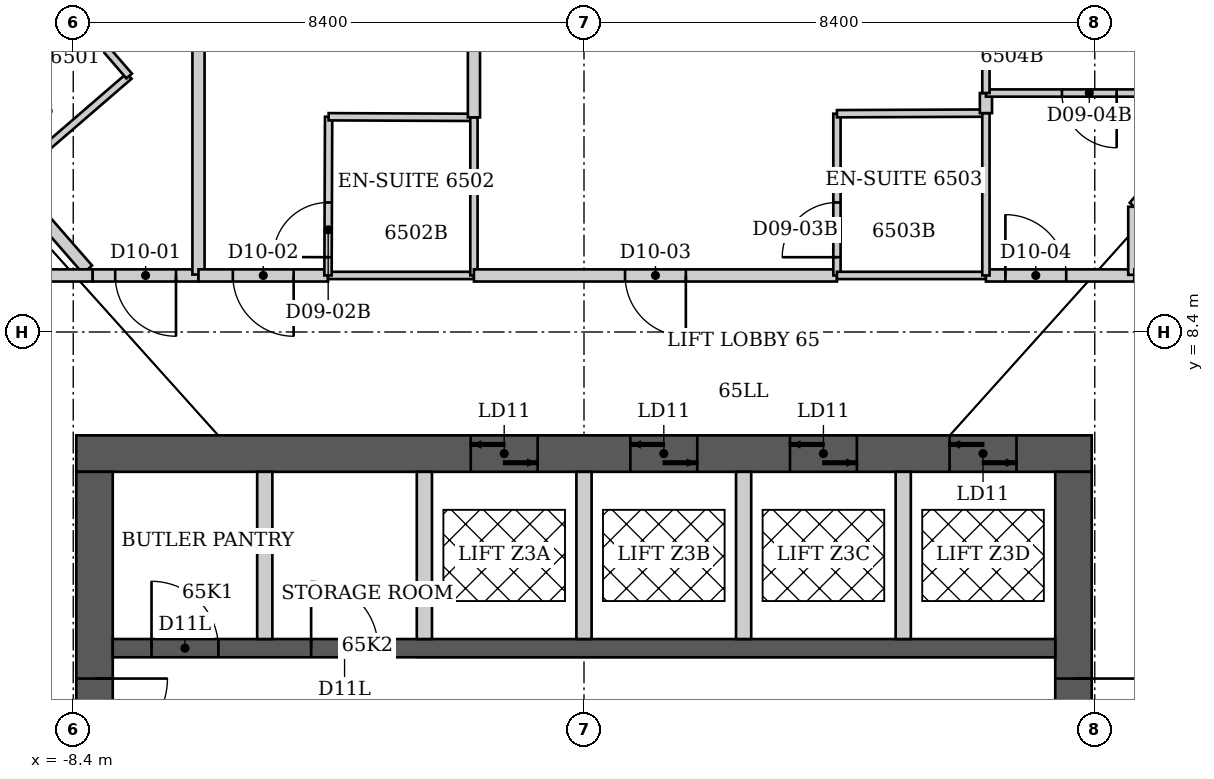
"""IFC4 building model, lengths in metres.
Left out: names, types, materials, properties, quantities, classifications, styles, units other than length and angle.
Written with IfcOpenShell. Run it as: python <this file> out.ifc"""

import sys

from ifc_helpers import new_model, si_unit, direction, frame, frame_2d, origin, place, context, subcontext, project, spatial, rectangle, extrude, element, fill, save


model = new_model("IFC4")
c1 = context("Model", 3, precision=1e-05, world=origin(), true_north=direction((0.0, 1.0)))
c2 = subcontext(c1, "Body", "Model", "MODEL_VIEW")
j1 = project(units=[si_unit("LENGTHUNIT", "METRE"), si_unit("PLANEANGLEUNIT", "RADIAN")], contexts=[c1])
p1 = place(None, origin())
s1 = spatial("IfcSite", under=j1, at=p1, CompositionType="ELEMENT")
p2 = place(p1, origin())
s2 = spatial("IfcBuilding", under=s1, at=p2, CompositionType="ELEMENT")
p3 = place(p2, frame((0.0, 0.0, 260.8)))
s3 = spatial("IfcBuildingStorey", under=s2, at=p3, CompositionType="ELEMENT", Elevation=260.8)
p4 = place(p3, frame((-8.35, 6.4, 0.0), z_axis=(0.0, 0.0, 1.0), x_axis=(1.0, 0.0, 0.0)))
e1 = element("IfcWall", 1, at=p4, inside=s3, PredefinedType="SHEAR", context=c2, shape_type="SweptSolid", body=[
    extrude(rectangle(XDim=16.7, YDim=0.6, at=frame_2d((8.35, 0.0))), origin(), (0.0, 0.0, 1.0), 3.8),
])
p5 = place(p4, frame((6.488, 0.0, 0.0)))
e2 = element("IfcOpeningElement", 2, at=p5, cuts=e1, PredefinedType="OPENING", context=c2, shape_type="SweptSolid", body=[
    extrude(rectangle(XDim=1.1, YDim=2.1, at=frame_2d((0.55, 1.05))), frame((0.0, 0.3, 0.0), z_axis=(0.0, -1.0, 0.0), x_axis=(1.0, 0.0, 0.0)), (0.0, 0.0, 1.0), 0.6),
])
p6 = place(p4, frame((9.113, 0.0, 0.0)))
e3 = element("IfcOpeningElement", 3, at=p6, cuts=e1, PredefinedType="OPENING", context=c2, shape_type="SweptSolid", body=[
    extrude(rectangle(XDim=1.1, YDim=2.1, at=frame_2d((0.55, 1.05))), frame((0.0, 0.3, 0.0), z_axis=(0.0, -1.0, 0.0), x_axis=(1.0, 0.0, 0.0)), (0.0, 0.0, 1.0), 0.6),
])
p7 = place(p4, frame((11.738, 0.0, 0.0)))
e4 = element("IfcOpeningElement", 4, at=p7, cuts=e1, PredefinedType="OPENING", context=c2, shape_type="SweptSolid", body=[
    extrude(rectangle(XDim=1.1, YDim=2.1, at=frame_2d((0.55, 1.05))), frame((0.0, 0.3, 0.0), z_axis=(0.0, -1.0, 0.0), x_axis=(1.0, 0.0, 0.0)), (0.0, 0.0, 1.0), 0.6),
])
p8 = place(p4, frame((14.363, 0.0, 0.0)))
e5 = element("IfcOpeningElement", 5, at=p8, cuts=e1, PredefinedType="OPENING", context=c2, shape_type="SweptSolid", body=[
    extrude(rectangle(XDim=1.1, YDim=2.1, at=frame_2d((0.55, 1.05))), frame((0.0, 0.3, 0.0), z_axis=(0.0, -1.0, 0.0), x_axis=(1.0, 0.0, 0.0)), (0.0, 0.0, 1.0), 0.6),
])
p9 = place(p3, frame((-8.05, -6.1, 0.0), z_axis=(0.0, 0.0, 1.0), x_axis=(0.0, 1.0, 0.0)))
e6 = element("IfcWall", 6, at=p9, inside=s3, PredefinedType="SHEAR", context=c2, shape_type="SweptSolid", body=[
    extrude(rectangle(XDim=12.2, YDim=0.6, at=frame_2d((6.1, 0.0))), origin(), (0.0, 0.0, 1.0), 3.8),
])
p10 = place(p9, frame((7.6, 0.0, 0.0)))
e7 = element("IfcOpeningElement", 7, at=p10, cuts=e6, PredefinedType="OPENING", context=c2, shape_type="SweptSolid", body=[
    extrude(rectangle(XDim=1.2, YDim=2.2, at=frame_2d((0.6, 1.1))), frame((0.0, 0.3, 0.0), z_axis=(0.0, -1.0, 0.0), x_axis=(1.0, 0.0, 0.0)), (0.0, 0.0, 1.0), 0.6),
])
p11 = place(p3, frame((8.05, -6.1, 0.0), z_axis=(0.0, 0.0, 1.0), x_axis=(0.0, 1.0, 0.0)))
e8 = element("IfcWall", 8, at=p11, inside=s3, PredefinedType="SHEAR", context=c2, shape_type="SweptSolid", body=[
    extrude(rectangle(XDim=12.2, YDim=0.6, at=frame_2d((6.1, 0.0))), origin(), (0.0, 0.0, 1.0), 3.8),
])
p12 = place(p11, frame((7.6, 0.0, 0.0)))
e9 = element("IfcOpeningElement", 9, at=p12, cuts=e8, PredefinedType="OPENING", context=c2, shape_type="SweptSolid", body=[
    extrude(rectangle(XDim=1.2, YDim=2.2, at=frame_2d((0.6, 1.1))), frame((0.0, 0.3, 0.0), z_axis=(0.0, -1.0, 0.0), x_axis=(1.0, 0.0, 0.0)), (0.0, 0.0, 1.0), 0.6),
])
p13 = place(p3, frame((-7.75, 3.2, 0.0), z_axis=(0.0, 0.0, 1.0), x_axis=(1.0, 0.0, 0.0)))
e10 = element("IfcWall", 10, at=p13, inside=s3, PredefinedType="SHEAR", context=c2, shape_type="SweptSolid", body=[
    extrude(rectangle(XDim=15.5, YDim=0.3, at=frame_2d((7.75, 0.0))), origin(), (0.0, 0.0, 1.0), 3.8),
])
p14 = place(p13, frame((0.637, 0.0, 0.0)))
e11 = element("IfcOpeningElement", 11, at=p14, cuts=e10, PredefinedType="OPENING", context=c2, shape_type="SweptSolid", body=[
    extrude(rectangle(XDim=1.1, YDim=2.2, at=frame_2d((0.55, 1.1))), frame((0.0, 0.15, 0.0), z_axis=(0.0, -1.0, 0.0), x_axis=(1.0, 0.0, 0.0)), (0.0, 0.0, 1.0), 0.3),
])
p15 = place(p13, frame((3.262, 0.0, 0.0)))
e12 = element("IfcOpeningElement", 12, at=p15, cuts=e10, PredefinedType="OPENING", context=c2, shape_type="SweptSolid", body=[
    extrude(rectangle(XDim=1.1, YDim=2.2, at=frame_2d((0.55, 1.1))), frame((0.0, 0.15, 0.0), z_axis=(0.0, -1.0, 0.0), x_axis=(1.0, 0.0, 0.0)), (0.0, 0.0, 1.0), 0.3),
])
for number, where, z_axis, x_axis in (
    (13, (-5.25, 3.35, 0.0), (0.0, 0.0, 1.0), (0.0, 1.0, 0.0)),
    (14, (-2.625, 3.35, 0.0), (0.0, 0.0, 1.0), (0.0, 1.0, 0.0)),
    (15, (0.0, 3.35, 0.0), (0.0, 0.0, 1.0), (0.0, 1.0, 0.0)),
    (16, (2.625, 3.35, 0.0), (0.0, 0.0, 1.0), (0.0, 1.0, 0.0)),
    (17, (5.25, 3.35, 0.0), (0.0, 0.0, 1.0), (0.0, 1.0, 0.0)),
):
    element("IfcWall", number, at=place(p3, frame(where, z_axis=z_axis, x_axis=x_axis)), inside=s3, PredefinedType="PARTITIONING", context=c2, shape_type="SweptSolid", body=[
        extrude(rectangle(XDim=2.75, YDim=0.25, at=frame_2d((1.375, 0.0))), origin(), (0.0, 0.0, 1.0), 3.8),
    ])
p16 = place(p3, frame((-9.45, 10.91, 0.0), z_axis=(0.0, 0.0, 1.0), x_axis=(0.757040252764, 0.65336823897, 0.0)))
e18 = element("IfcWall", 18, at=p16, inside=s3, PredefinedType="PARTITIONING", context=c2, shape_type="SweptSolid", body=[
    extrude(rectangle(XDim=2.602, YDim=0.12, at=frame_2d((1.301, 0.0))), origin(), (0.0, 0.0, 1.0), 3.64),
])
p17 = place(p3, frame((-9.37, 10.81, 0.0), z_axis=(0.0, 0.0, 1.0), x_axis=(0.657042073586, -0.753853907291, 0.0)))
e19 = element("IfcWall", 19, at=p17, inside=s3, PredefinedType="PARTITIONING", context=c2, shape_type="SweptSolid", body=[
    extrude(rectangle(XDim=1.833, YDim=0.2, at=frame_2d((0.917, 0.0))), origin(), (0.0, 0.0, 1.0), 3.64),
])
p18 = place(p3, frame((-8.08, 9.33, 0.0), z_axis=(0.0, 0.0, 1.0), x_axis=(-1.0, 0.0, 0.0)))
e20 = element("IfcWall", 20, at=p18, inside=s3, PredefinedType="PARTITIONING", context=c2, shape_type="SweptSolid", body=[
    extrude(rectangle(XDim=3.11, YDim=0.2, at=frame_2d((1.555, 0.0))), origin(), (0.0, 0.0, 1.0), 3.64),
])
p19 = place(p18, frame((1.1, 0.0, 0.0)))
e21 = element("IfcOpeningElement", 21, at=p19, cuts=e20, PredefinedType="OPENING", context=c2, shape_type="SweptSolid", body=[
    extrude(rectangle(XDim=1.0, YDim=2.13, at=frame_2d((0.5, 1.065))), frame((0.0, 0.1, 0.0), z_axis=(0.0, -1.0, 0.0), x_axis=(1.0, 0.0, 0.0)), (0.0, 0.0, 1.0), 0.2),
])
p20 = place(p3, frame((-7.48, 12.61, 0.0), z_axis=(0.0, 0.0, 1.0), x_axis=(-0.653238965593, 0.75715180369, 0.0)))
e22 = element("IfcWall", 22, at=p20, inside=s3, PredefinedType="PARTITIONING", context=c2, shape_type="SweptSolid", body=[
    extrude(rectangle(XDim=2.404, YDim=0.12, at=frame_2d((1.202, 0.0))), origin(), (0.0, 0.0, 1.0), 3.64),
])
p21 = place(p3, frame((-6.34, 9.33, 0.0), z_axis=(0.0, 0.0, 1.0), x_axis=(-1.0, 0.0, 0.0)))
e23 = element("IfcWall", 23, at=p21, inside=s3, PredefinedType="PARTITIONING", context=c2, shape_type="SweptSolid", body=[
    extrude(rectangle(XDim=1.74, YDim=0.2, at=frame_2d((0.87, 0.0))), origin(), (0.0, 0.0, 1.0), 3.64),
])
p22 = place(p21, frame((0.37, 0.0, 0.0)))
e24 = element("IfcOpeningElement", 24, at=p22, cuts=e23, PredefinedType="OPENING", context=c2, shape_type="SweptSolid", body=[
    extrude(rectangle(XDim=1.0, YDim=2.13, at=frame_2d((0.5, 1.065))), frame((0.0, 0.1, 0.0), z_axis=(0.0, -1.0, 0.0), x_axis=(1.0, 0.0, 0.0)), (0.0, 0.0, 1.0), 0.2),
])
p23 = place(p3, frame((-6.34, 19.8, 0.0), z_axis=(0.0, 0.0, 1.0), x_axis=(0.0, -1.0, 0.0)))
e25 = element("IfcWall", 25, at=p23, inside=s3, PredefinedType="PARTITIONING", context=c2, shape_type="SweptSolid", body=[
    extrude(rectangle(XDim=10.455, YDim=0.2, at=frame_2d((5.228, 0.0))), origin(), (0.0, 0.0, 1.0), 3.64),
])
p24 = place(p3, frame((-4.21, 9.33, 0.0), z_axis=(0.0, 0.0, 1.0), x_axis=(-1.0, 0.0, 0.0)))
e26 = element("IfcWall", 26, at=p24, inside=s3, PredefinedType="PARTITIONING", context=c2, shape_type="SweptSolid", body=[
    extrude(rectangle(XDim=2.13, YDim=0.2, at=frame_2d((1.065, 0.0))), origin(), (0.0, 0.0, 1.0), 3.64),
])
p25 = place(p24, frame((0.565, 0.0, 0.0)))
e27 = element("IfcOpeningElement", 27, at=p25, cuts=e26, PredefinedType="OPENING", context=c2, shape_type="SweptSolid", body=[
    extrude(rectangle(XDim=1.0, YDim=2.13, at=frame_2d((0.5, 1.065))), frame((0.0, 0.1, 0.0), z_axis=(0.0, -1.0, 0.0), x_axis=(1.0, 0.0, 0.0)), (0.0, 0.0, 1.0), 0.2),
])
p26 = place(p3, frame((-4.21, 9.33, 0.0), z_axis=(0.0, 0.0, 1.0), x_axis=(1.0, 0.0, 0.0)))
e28 = element("IfcWall", 28, at=p26, inside=s3, PredefinedType="PARTITIONING", context=c2, shape_type="SweptSolid", body=[
    extrude(rectangle(XDim=2.4, YDim=0.12, at=frame_2d((1.2, 0.0))), origin(), (0.0, 0.0, 1.0), 3.64),
])
p27 = place(p3, frame((-4.2, 11.94, 0.0), z_axis=(0.0, 0.0, 1.0), x_axis=(-0.003835331941, -0.999992645087, 0.0)))
e29 = element("IfcWall", 29, at=p27, inside=s3, PredefinedType="PARTITIONING", context=c2, shape_type="SweptSolid", body=[
    extrude(rectangle(XDim=2.61, YDim=0.12, at=frame_2d((1.305, 0.0))), origin(), (0.0, 0.0, 1.0), 3.64),
])
p28 = place(p27, frame((1.41, 0.0, 0.0)))
e30 = element("IfcOpeningElement", 30, at=p28, cuts=e29, PredefinedType="OPENING", context=c2, shape_type="SweptSolid", body=[
    extrude(rectangle(XDim=0.9, YDim=2.03, at=frame_2d((0.45, 1.015))), frame((0.0, 0.06, 0.0), z_axis=(0.0, -1.0, 0.0), x_axis=(1.0, 0.0, 0.0)), (0.0, 0.0, 1.0), 0.12),
])
p29 = place(p3, frame((-1.81, 11.93, 0.0), z_axis=(0.0, 0.0, 1.0), x_axis=(-0.999991228874, 0.00418833797, 0.0)))
e31 = element("IfcWall", 31, at=p29, inside=s3, PredefinedType="PARTITIONING", context=c2, shape_type="SweptSolid", body=[
    extrude(rectangle(XDim=2.39, YDim=0.12, at=frame_2d((1.195, 0.0))), origin(), (0.0, 0.0, 1.0), 3.64),
])
p30 = place(p3, frame((-1.81, 11.93, 0.0), z_axis=(0.0, 0.0, 1.0), x_axis=(0.0, -1.0, 0.0)))
e32 = element("IfcWall", 32, at=p30, inside=s3, PredefinedType="PARTITIONING", context=c2, shape_type="SweptSolid", body=[
    extrude(rectangle(XDim=2.6, YDim=0.12, at=frame_2d((1.3, 0.0))), origin(), (0.0, 0.0, 1.0), 3.023),
])
p31 = place(p3, frame((-1.81, 19.71, 0.0), z_axis=(0.0, 0.0, 1.0), x_axis=(0.0, -1.0, 0.0)))
e33 = element("IfcWall", 33, at=p31, inside=s3, PredefinedType="PARTITIONING", context=c2, shape_type="SweptSolid", body=[
    extrude(rectangle(XDim=7.78, YDim=0.2, at=frame_2d((3.89, 0.0))), origin(), (0.0, 0.0, 1.0), 3.023),
])
p32 = place(p3, frame((4.16, 9.33, 0.0), z_axis=(0.0, 0.0, 1.0), x_axis=(-1.0, 0.0, 0.0)))
e34 = element("IfcWall", 34, at=p32, inside=s3, PredefinedType="PARTITIONING", context=c2, shape_type="SweptSolid", body=[
    extrude(rectangle(XDim=5.97, YDim=0.2, at=frame_2d((2.985, 0.0))), origin(), (0.0, 0.0, 1.0), 3.64),
])
p33 = place(p32, frame((2.485, 0.0, 0.0)))
e35 = element("IfcOpeningElement", 35, at=p33, cuts=e34, PredefinedType="OPENING", context=c2, shape_type="SweptSolid", body=[
    extrude(rectangle(XDim=1.0, YDim=2.13, at=frame_2d((0.5, 1.065))), frame((0.0, 0.1, 0.0), z_axis=(0.0, -1.0, 0.0), x_axis=(1.0, 0.0, 0.0)), (0.0, 0.0, 1.0), 0.2),
])
p34 = place(p3, frame((4.16, 11.99, 0.0), z_axis=(0.0, 0.0, 1.0), x_axis=(0.0, -1.0, 0.0)))
e36 = element("IfcWall", 36, at=p34, inside=s3, PredefinedType="PARTITIONING", context=c2, shape_type="SweptSolid", body=[
    extrude(rectangle(XDim=2.66, YDim=0.12, at=frame_2d((1.33, 0.0))), origin(), (0.0, 0.0, 1.0), 3.64),
])
p35 = place(p34, frame((1.46, 0.0, 0.0)))
e37 = element("IfcOpeningElement", 37, at=p35, cuts=e36, PredefinedType="OPENING", context=c2, shape_type="SweptSolid", body=[
    extrude(rectangle(XDim=0.9, YDim=2.03, at=frame_2d((0.45, 1.015))), frame((0.0, 0.06, 0.0), z_axis=(0.0, -1.0, 0.0), x_axis=(1.0, 0.0, 0.0)), (0.0, 0.0, 1.0), 0.12),
])
p36 = place(p3, frame((6.61, 9.33, 0.0), z_axis=(0.0, 0.0, 1.0), x_axis=(-1.0, 0.0, 0.0)))
e38 = element("IfcWall", 38, at=p36, inside=s3, PredefinedType="PARTITIONING", context=c2, shape_type="SweptSolid", body=[
    extrude(rectangle(XDim=2.45, YDim=0.12, at=frame_2d((1.225, 0.0))), origin(), (0.0, 0.0, 1.0), 3.64),
])
p37 = place(p3, frame((6.61, 9.33, 0.0), z_axis=(0.0, 0.0, 1.0), x_axis=(1.0, 0.0, 0.0)))
e39 = element("IfcWall", 39, at=p37, inside=s3, PredefinedType="PARTITIONING", context=c2, shape_type="SweptSolid", body=[
    extrude(rectangle(XDim=2.44, YDim=0.2, at=frame_2d((1.22, 0.0))), origin(), (0.0, 0.0, 1.0), 3.64),
])
p38 = place(p37, frame((0.32, 0.0, 0.0)))
e40 = element("IfcOpeningElement", 40, at=p38, cuts=e39, PredefinedType="OPENING", context=c2, shape_type="SweptSolid", body=[
    extrude(rectangle(XDim=1.0, YDim=2.13, at=frame_2d((0.5, 1.065))), frame((0.0, 0.1, 0.0), z_axis=(0.0, -1.0, 0.0), x_axis=(1.0, 0.0, 0.0)), (0.0, 0.0, 1.0), 0.2),
])
p39 = place(p3, frame((6.61, 12.0, 0.0), z_axis=(0.0, 0.0, 1.0), x_axis=(-0.999991655295, -0.004085258855, 0.0)))
e41 = element("IfcWall", 41, at=p39, inside=s3, PredefinedType="PARTITIONING", context=c2, shape_type="SweptSolid", body=[
    extrude(rectangle(XDim=2.45, YDim=0.12, at=frame_2d((1.225, 0.0))), origin(), (0.0, 0.0, 1.0), 3.64),
])
p40 = place(p3, frame((6.61, 12.0, 0.0), z_axis=(0.0, 0.0, 1.0), x_axis=(0.0, -1.0, 0.0)))
e42 = element("IfcWall", 42, at=p40, inside=s3, PredefinedType="PARTITIONING", context=c2, shape_type="SweptSolid", body=[
    extrude(rectangle(XDim=2.67, YDim=0.12, at=frame_2d((1.335, 0.0))), origin(), (0.0, 0.0, 1.0), 3.64),
])
p41 = place(p3, frame((6.61, 12.33, 0.0), z_axis=(0.0, 0.0, 1.0), x_axis=(0.0, -1.0, 0.0)))
e43 = element("IfcWall", 43, at=p41, inside=s3, PredefinedType="PARTITIONING", context=c2, shape_type="SweptSolid", body=[
    extrude(rectangle(XDim=0.33, YDim=0.2, at=frame_2d((0.165, 0.0))), origin(), (0.0, 0.0, 1.0), 3.64),
])
p42 = place(p3, frame((6.61, 12.33, 0.0), z_axis=(0.0, 0.0, 1.0), x_axis=(1.0, 0.0, 0.0)))
e44 = element("IfcWall", 44, at=p42, inside=s3, PredefinedType="PARTITIONING", context=c2, shape_type="SweptSolid", body=[
    extrude(rectangle(XDim=2.6, YDim=0.12, at=frame_2d((1.3, 0.0))), origin(), (0.0, 0.0, 1.0), 3.64),
])
p43 = place(p42, frame((1.25, 0.0, 0.0)))
e45 = element("IfcOpeningElement", 45, at=p43, cuts=e44, PredefinedType="OPENING", context=c2, shape_type="SweptSolid", body=[
    extrude(rectangle(XDim=0.9, YDim=2.03, at=frame_2d((0.45, 1.015))), frame((0.0, 0.06, 0.0), z_axis=(0.0, -1.0, 0.0), x_axis=(1.0, 0.0, 0.0)), (0.0, 0.0, 1.0), 0.12),
])
p44 = place(p3, frame((6.61, 14.73, 0.0), z_axis=(0.0, 0.0, 1.0), x_axis=(0.0, -1.0, 0.0)))
e46 = element("IfcWall", 46, at=p44, inside=s3, PredefinedType="PARTITIONING", context=c2, shape_type="SweptSolid", body=[
    extrude(rectangle(XDim=2.4, YDim=0.12, at=frame_2d((1.2, 0.0))), origin(), (0.0, 0.0, 1.0), 3.64),
])
p45 = place(p3, frame((9.05, 10.46, 0.0), z_axis=(0.0, 0.0, 1.0), x_axis=(0.0, -1.0, 0.0)))
e47 = element("IfcWall", 47, at=p45, inside=s3, PredefinedType="PARTITIONING", context=c2, shape_type="SweptSolid", body=[
    extrude(rectangle(XDim=1.12, YDim=0.2, at=frame_2d((0.56, 0.0))), origin(), (0.0, 0.0, 1.0), 3.64),
])
p46 = place(p3, frame((10.04, 9.33, 0.0), z_axis=(0.0, 0.0, 1.0), x_axis=(-1.0, 0.0, 0.0)))
e48 = element("IfcWall", 48, at=p46, inside=s3, PredefinedType="PARTITIONING", context=c2, shape_type="SweptSolid", body=[
    extrude(rectangle(XDim=0.99, YDim=0.2, at=frame_2d((0.495, 0.0))), origin(), (0.0, 0.0, 1.0), 3.64),
])
p47 = place(p3, frame((16.89, 19.507, 0.0), z_axis=(0.0, 0.0, 1.0), x_axis=(-0.654896377117, -0.755718687899, 0.0)))
e49 = element("IfcWall", 49, at=p47, inside=s3, PredefinedType="PARTITIONING", context=c2, shape_type="SweptSolid", body=[
    extrude(rectangle(XDim=11.972, YDim=0.2, at=frame_2d((5.986, 0.0))), origin(), (0.0, 0.0, 1.0), 3.64),
])
p48 = place(p22, origin())
e50 = element("IfcDoor", 50, at=p48, inside=s3, OperationType="SINGLE_SWING_LEFT", PredefinedType="DOOR", context=c2, shape_type="SweptSolid", body=[
    extrude(rectangle(XDim=1.0, YDim=2.13, at=frame_2d((0.5, 1.065))), frame((0.0, 0.025, 0.0), z_axis=(0.0, -1.0, 0.0), x_axis=(1.0, 0.0, 0.0)), (0.0, 0.0, 1.0), 0.05),
])
fill(e24, e50)
p49 = place(p25, origin())
e51 = element("IfcDoor", 51, at=p49, inside=s3, OperationType="SINGLE_SWING_LEFT", PredefinedType="DOOR", context=c2, shape_type="SweptSolid", body=[
    extrude(rectangle(XDim=1.0, YDim=2.13, at=frame_2d((0.5, 1.065))), frame((0.0, 0.025, 0.0), z_axis=(0.0, -1.0, 0.0), x_axis=(1.0, 0.0, 0.0)), (0.0, 0.0, 1.0), 0.05),
])
fill(e27, e51)
p50 = place(p28, origin())
e52 = element("IfcDoor", 52, at=p50, inside=s3, OperationType="SINGLE_SWING_RIGHT", PredefinedType="DOOR", context=c2, shape_type="SweptSolid", body=[
    extrude(rectangle(XDim=0.9, YDim=2.03, at=frame_2d((0.45, 1.015))), frame((0.0, 0.025, 0.0), z_axis=(0.0, -1.0, 0.0), x_axis=(1.0, 0.0, 0.0)), (0.0, 0.0, 1.0), 0.05),
])
fill(e30, e52)
p51 = place(p33, origin())
e53 = element("IfcDoor", 53, at=p51, inside=s3, OperationType="SINGLE_SWING_LEFT", PredefinedType="DOOR", context=c2, shape_type="SweptSolid", body=[
    extrude(rectangle(XDim=1.0, YDim=2.13, at=frame_2d((0.5, 1.065))), frame((0.0, 0.025, 0.0), z_axis=(0.0, -1.0, 0.0), x_axis=(1.0, 0.0, 0.0)), (0.0, 0.0, 1.0), 0.05),
])
fill(e35, e53)
p52 = place(p35, origin())
e54 = element("IfcDoor", 54, at=p52, inside=s3, OperationType="SINGLE_SWING_RIGHT", PredefinedType="DOOR", context=c2, shape_type="SweptSolid", body=[
    extrude(rectangle(XDim=0.9, YDim=2.03, at=frame_2d((0.45, 1.015))), frame((0.0, 0.025, 0.0), z_axis=(0.0, -1.0, 0.0), x_axis=(1.0, 0.0, 0.0)), (0.0, 0.0, 1.0), 0.05),
])
fill(e37, e54)
p53 = place(p38, origin())
e55 = element("IfcDoor", 55, at=p53, inside=s3, OperationType="SINGLE_SWING_LEFT", PredefinedType="DOOR", context=c2, shape_type="SweptSolid", body=[
    extrude(rectangle(XDim=1.0, YDim=2.13, at=frame_2d((0.5, 1.065))), frame((0.0, 0.025, 0.0), z_axis=(0.0, -1.0, 0.0), x_axis=(1.0, 0.0, 0.0)), (0.0, 0.0, 1.0), 0.05),
])
fill(e40, e55)
p54 = place(p43, origin())
e56 = element("IfcDoor", 56, at=p54, inside=s3, OperationType="SINGLE_SWING_RIGHT", PredefinedType="DOOR", context=c2, shape_type="SweptSolid", body=[
    extrude(rectangle(XDim=0.9, YDim=2.03, at=frame_2d((0.45, 1.015))), frame((0.0, 0.025, 0.0), z_axis=(0.0, -1.0, 0.0), x_axis=(1.0, 0.0, 0.0)), (0.0, 0.0, 1.0), 0.05),
])
fill(e45, e56)
p55 = place(p10, origin())
e57 = element("IfcDoor", 57, at=p55, inside=s3, OperationType="SINGLE_SWING_RIGHT", PredefinedType="DOOR", context=c2, shape_type="SweptSolid", body=[
    extrude(rectangle(XDim=1.2, YDim=2.2, at=frame_2d((0.6, 1.1))), frame((0.0, 0.025, 0.0), z_axis=(0.0, -1.0, 0.0), x_axis=(1.0, 0.0, 0.0)), (0.0, 0.0, 1.0), 0.05),
])
fill(e7, e57)
p56 = place(p12, origin())
e58 = element("IfcDoor", 58, at=p56, inside=s3, OperationType="SINGLE_SWING_RIGHT", PredefinedType="DOOR", context=c2, shape_type="SweptSolid", body=[
    extrude(rectangle(XDim=1.2, YDim=2.2, at=frame_2d((0.6, 1.1))), frame((0.0, 0.025, 0.0), z_axis=(0.0, -1.0, 0.0), x_axis=(1.0, 0.0, 0.0)), (0.0, 0.0, 1.0), 0.05),
])
fill(e9, e58)
p57 = place(p14, origin())
e59 = element("IfcDoor", 59, at=p57, inside=s3, OperationType="SINGLE_SWING_LEFT", PredefinedType="DOOR", context=c2, shape_type="SweptSolid", body=[
    extrude(rectangle(XDim=1.1, YDim=2.2, at=frame_2d((0.55, 1.1))), frame((0.0, 0.025, 0.0), z_axis=(0.0, -1.0, 0.0), x_axis=(1.0, 0.0, 0.0)), (0.0, 0.0, 1.0), 0.05),
])
fill(e11, e59)
p58 = place(p15, origin())
e60 = element("IfcDoor", 60, at=p58, inside=s3, OperationType="SINGLE_SWING_LEFT", PredefinedType="DOOR", context=c2, shape_type="SweptSolid", body=[
    extrude(rectangle(XDim=1.1, YDim=2.2, at=frame_2d((0.55, 1.1))), frame((0.0, 0.025, 0.0), z_axis=(0.0, -1.0, 0.0), x_axis=(1.0, 0.0, 0.0)), (0.0, 0.0, 1.0), 0.05),
])
fill(e12, e60)
p59 = place(p5, origin())
e61 = element("IfcDoor", 61, at=p59, inside=s3, OperationType="DOUBLE_DOOR_SLIDING", PredefinedType="DOOR", context=c2, shape_type="SweptSolid", body=[
    extrude(rectangle(XDim=1.1, YDim=2.1, at=frame_2d((0.55, 1.05))), frame((0.0, 0.025, 0.0), z_axis=(0.0, -1.0, 0.0), x_axis=(1.0, 0.0, 0.0)), (0.0, 0.0, 1.0), 0.05),
])
fill(e2, e61)
p60 = place(p6, origin())
e62 = element("IfcDoor", 62, at=p60, inside=s3, OperationType="DOUBLE_DOOR_SLIDING", PredefinedType="DOOR", context=c2, shape_type="SweptSolid", body=[
    extrude(rectangle(XDim=1.1, YDim=2.1, at=frame_2d((0.55, 1.05))), frame((0.0, 0.025, 0.0), z_axis=(0.0, -1.0, 0.0), x_axis=(1.0, 0.0, 0.0)), (0.0, 0.0, 1.0), 0.05),
])
fill(e3, e62)
p61 = place(p7, origin())
e63 = element("IfcDoor", 63, at=p61, inside=s3, OperationType="DOUBLE_DOOR_SLIDING", PredefinedType="DOOR", context=c2, shape_type="SweptSolid", body=[
    extrude(rectangle(XDim=1.1, YDim=2.1, at=frame_2d((0.55, 1.05))), frame((0.0, 0.025, 0.0), z_axis=(0.0, -1.0, 0.0), x_axis=(1.0, 0.0, 0.0)), (0.0, 0.0, 1.0), 0.05),
])
fill(e4, e63)
p62 = place(p8, origin())
e64 = element("IfcDoor", 64, at=p62, inside=s3, OperationType="DOUBLE_DOOR_SLIDING", PredefinedType="DOOR", context=c2, shape_type="SweptSolid", body=[
    extrude(rectangle(XDim=1.1, YDim=2.1, at=frame_2d((0.55, 1.05))), frame((0.0, 0.025, 0.0), z_axis=(0.0, -1.0, 0.0), x_axis=(1.0, 0.0, 0.0)), (0.0, 0.0, 1.0), 0.05),
])
fill(e5, e64)
save(model, sys.argv[1])
